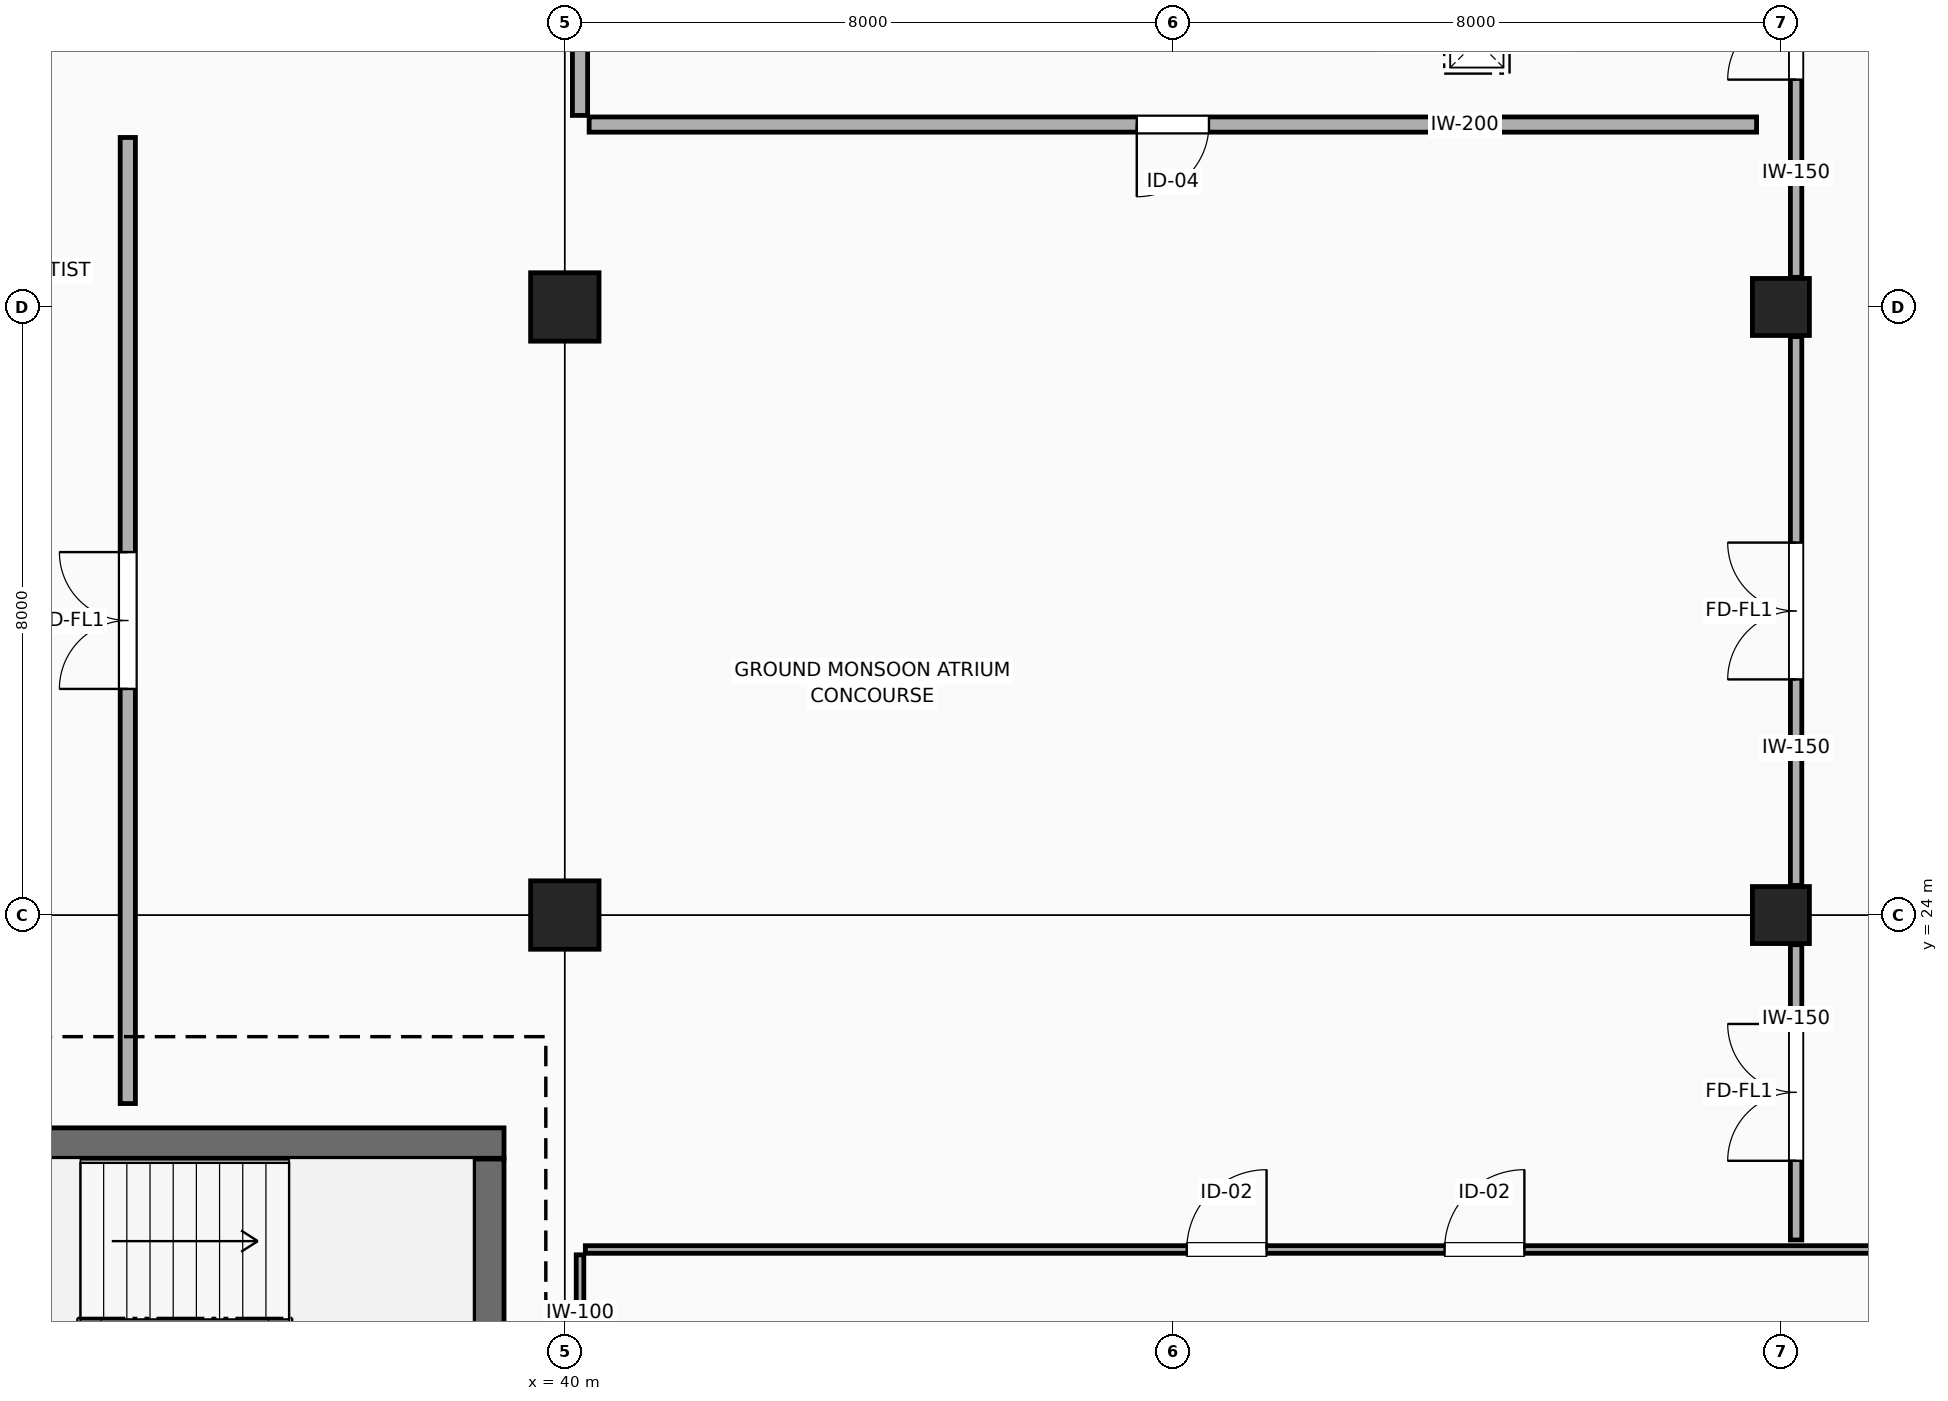
"""IFC4 building model, lengths in metres.
Left out: names, types, materials, properties, quantities, classifications, styles, units other than length and angle.
Written with IfcOpenShell. Run it as: python <this file> out.ifc"""

import sys

from ifc_helpers import new_model, si_unit, direction, frame, frame_2d, origin, origin_2d, place, context, subcontext, project, spatial, rectangle, extrude, element, fill, save


model = new_model("IFC4")
c1 = context("Model", 3, precision=1e-05, world=origin(), true_north=direction((0.0, 1.0)))
c2 = subcontext(c1, "Body", "Model", "MODEL_VIEW")
j1 = project(units=[si_unit("LENGTHUNIT", "METRE"), si_unit("PLANEANGLEUNIT", "RADIAN")], contexts=[c1])
p1 = place(None, origin())
s1 = spatial("IfcSite", under=j1, at=p1, CompositionType="ELEMENT")
p2 = place(p1, origin())
s2 = spatial("IfcBuilding", under=s1, at=p2, CompositionType="ELEMENT")
p3 = place(p2, origin())
s3 = spatial("IfcBuildingStorey", under=s2, at=p3, CompositionType="ELEMENT", Elevation=0.0)
for number, where, z_axis, x_axis in (
    (1, (40.0, 24.0, 0.0), (0.0, 0.0, 1.0), (1.0, 0.0, 0.0)),
    (2, (40.0, 32.0, 0.0), (0.0, 0.0, 1.0), (1.0, 0.0, 0.0)),
):
    element("IfcColumn", number, at=place(p3, frame(where, z_axis=z_axis, x_axis=x_axis)), inside=s3, PredefinedType="COLUMN", context=c2, shape_type="SweptSolid", body=[
        extrude(rectangle(XDim=0.9, YDim=0.9, at=origin_2d()), origin(), (0.0, 0.0, 1.0), 5.4),
    ])
for number, where, z_axis, x_axis in (
    (3, (56.0, 24.0, 0.0), (0.0, 0.0, 1.0), (1.0, 0.0, 0.0)),
    (4, (56.0, 32.0, 0.0), (0.0, 0.0, 1.0), (1.0, 0.0, 0.0)),
):
    element("IfcColumn", number, at=place(p3, frame(where, z_axis=z_axis, x_axis=x_axis)), inside=s3, PredefinedType="COLUMN", context=c2, shape_type="SweptSolid", body=[
        extrude(rectangle(XDim=0.75, YDim=0.75, at=origin_2d()), origin(), (0.0, 0.0, 1.0), 5.4),
    ])
p4 = place(p3, frame((39.2, 21.0, 0.0), z_axis=(0.0, 0.0, 1.0), x_axis=(-1.0, 0.0, 0.0)))
e5 = element("IfcWall", 5, at=p4, inside=s3, PredefinedType="SHEAR", context=c2, shape_type="SweptSolid", body=[
    extrude(rectangle(XDim=8.896, YDim=0.4, at=frame_2d((4.448, 0.0))), origin(), (0.0, 0.0, 1.0), 5.12),
])
p5 = place(p3, frame((39.0, 12.41, 0.0), z_axis=(0.0, 0.0, 1.0), x_axis=(0.0, 1.0, 0.0)))
e6 = element("IfcWall", 6, at=p5, inside=s3, PredefinedType="SHEAR", context=c2, shape_type="SweptSolid", body=[
    extrude(rectangle(XDim=8.38, YDim=0.4, at=frame_2d((4.19, 0.0))), origin(), (0.0, 0.0, 1.0), 5.12),
])
p6 = place(p3, frame((40.27, 19.6, 0.0), z_axis=(0.0, 0.0, 1.0), x_axis=(1.0, 0.0, 0.0)))
e7 = element("IfcWall", 7, at=p6, inside=s3, PredefinedType="PARTITIONING", context=c2, shape_type="SweptSolid", body=[
    extrude(rectangle(XDim=23.66, YDim=0.1, at=frame_2d((11.83, 0.0))), origin(), (0.0, 0.0, 1.0), 4.3),
])
p7 = place(p6, frame((11.305, 0.0, 0.0)))
e8 = element("IfcOpeningElement", 8, at=p7, cuts=e7, PredefinedType="OPENING", context=c2, shape_type="SweptSolid", body=[
    extrude(rectangle(XDim=1.05, YDim=2.15, at=frame_2d((0.525, 1.075))), frame((0.0, 0.06, 0.0), z_axis=(0.0, -1.0, 0.0), x_axis=(1.0, 0.0, 0.0)), (0.0, 0.0, 1.0), 0.12),
])
p8 = place(p6, frame((7.913, 0.0, 0.0)))
e9 = element("IfcOpeningElement", 9, at=p8, cuts=e7, PredefinedType="OPENING", context=c2, shape_type="SweptSolid", body=[
    extrude(rectangle(XDim=1.05, YDim=2.15, at=frame_2d((0.525, 1.075))), frame((0.0, 0.06, 0.0), z_axis=(0.0, -1.0, 0.0), x_axis=(1.0, 0.0, 0.0)), (0.0, 0.0, 1.0), 0.12),
])
p9 = place(p3, frame((40.2, 16.465, 0.0), z_axis=(0.0, 0.0, 1.0), x_axis=(0.0, 1.0, 0.0)))
e10 = element("IfcWall", 10, at=p9, inside=s3, PredefinedType="PARTITIONING", context=c2, shape_type="SweptSolid", body=[
    extrude(rectangle(XDim=3.065, YDim=0.1, at=frame_2d((1.532, 0.0))), origin(), (0.0, 0.0, 1.0), 4.65),
])
p10 = place(p3, frame((56.2, 19.725, 0.0), z_axis=(0.0, 0.0, 1.0), x_axis=(0.0, 1.0, 0.0)))
e11 = element("IfcWall", 11, at=p10, inside=s3, PredefinedType="PARTITIONING", context=c2, shape_type="SweptSolid", body=[
    extrude(rectangle(XDim=3.885, YDim=0.15, at=frame_2d((1.942, 0.0))), origin(), (0.0, 0.0, 1.0), 4.45),
])
p11 = place(p10, frame((1.042, 0.0, 0.0)))
e12 = element("IfcOpeningElement", 12, at=p11, cuts=e11, PredefinedType="OPENING", context=c2, shape_type="SweptSolid", body=[
    extrude(rectangle(XDim=1.8, YDim=2.15, at=frame_2d((0.9, 1.075))), frame((0.0, 0.085, 0.0), z_axis=(0.0, -1.0, 0.0), x_axis=(1.0, 0.0, 0.0)), (0.0, 0.0, 1.0), 0.17),
])
p12 = place(p3, frame((56.2, 24.39, 0.0), z_axis=(0.0, 0.0, 1.0), x_axis=(0.0, 1.0, 0.0)))
e13 = element("IfcWall", 13, at=p12, inside=s3, PredefinedType="PARTITIONING", context=c2, shape_type="SweptSolid", body=[
    extrude(rectangle(XDim=7.22, YDim=0.15, at=frame_2d((3.61, 0.0))), origin(), (0.0, 0.0, 1.0), 4.65),
])
p13 = place(p12, frame((2.71, 0.0, 0.0)))
e14 = element("IfcOpeningElement", 14, at=p13, cuts=e13, PredefinedType="OPENING", context=c2, shape_type="SweptSolid", body=[
    extrude(rectangle(XDim=1.8, YDim=2.15, at=frame_2d((0.9, 1.075))), frame((0.0, 0.085, 0.0), z_axis=(0.0, -1.0, 0.0), x_axis=(1.0, 0.0, 0.0)), (0.0, 0.0, 1.0), 0.17),
])
p14 = place(p3, frame((56.2, 32.39, 0.0), z_axis=(0.0, 0.0, 1.0), x_axis=(0.0, 1.0, 0.0)))
e15 = element("IfcWall", 15, at=p14, inside=s3, PredefinedType="PARTITIONING", context=c2, shape_type="SweptSolid", body=[
    extrude(rectangle(XDim=5.515, YDim=0.15, at=frame_2d((2.758, 0.0))), origin(), (0.0, 0.0, 1.0), 4.5),
])
p15 = place(p14, frame((2.601, 0.0, 0.0)))
e16 = element("IfcOpeningElement", 16, at=p15, cuts=e15, PredefinedType="OPENING", context=c2, shape_type="SweptSolid", body=[
    extrude(rectangle(XDim=1.8, YDim=2.15, at=frame_2d((0.9, 1.075))), frame((0.0, 0.085, 0.0), z_axis=(0.0, -1.0, 0.0), x_axis=(1.0, 0.0, 0.0)), (0.0, 0.0, 1.0), 0.17),
])
p16 = place(p3, frame((55.68, 34.4, 0.0), z_axis=(0.0, 0.0, 1.0), x_axis=(-1.0, 0.0, 0.0)))
e17 = element("IfcWall", 17, at=p16, inside=s3, PredefinedType="PARTITIONING", context=c2, shape_type="SweptSolid", body=[
    extrude(rectangle(XDim=15.36, YDim=0.2, at=frame_2d((7.68, 0.0))), origin(), (0.0, 0.0, 1.0), 5.11),
])
p17 = place(p16, frame((7.205, 0.0, 0.0)))
e18 = element("IfcOpeningElement", 18, at=p17, cuts=e17, PredefinedType="OPENING", context=c2, shape_type="SweptSolid", body=[
    extrude(rectangle(XDim=0.95, YDim=2.15, at=frame_2d((0.475, 1.075))), frame((0.0, 0.11, 0.0), z_axis=(0.0, -1.0, 0.0), x_axis=(1.0, 0.0, 0.0)), (0.0, 0.0, 1.0), 0.22),
])
p18 = place(p3, frame((40.2, 34.52, 0.0), z_axis=(0.0, 0.0, 1.0), x_axis=(0.0, 1.0, 0.0)))
e19 = element("IfcWall", 19, at=p18, inside=s3, PredefinedType="PARTITIONING", context=c2, shape_type="SweptSolid", body=[
    extrude(rectangle(XDim=6.015, YDim=0.2, at=frame_2d((3.007, 0.0))), origin(), (0.0, 0.0, 1.0), 4.25),
])
p19 = place(p3, frame((34.25, 21.52, 0.0), z_axis=(0.0, 0.0, 1.0), x_axis=(0.0, 1.0, 0.0)))
e20 = element("IfcWall", 20, at=p19, inside=s3, PredefinedType="PARTITIONING", context=c2, shape_type="SweptSolid", body=[
    extrude(rectangle(XDim=12.71, YDim=0.2, at=frame_2d((6.355, 0.0))), origin(), (0.0, 0.0, 1.0), 5.11),
])
p20 = place(p19, frame((5.455, 0.0, 0.0)))
e21 = element("IfcOpeningElement", 21, at=p20, cuts=e20, PredefinedType="OPENING", context=c2, shape_type="SweptSolid", body=[
    extrude(rectangle(XDim=1.8, YDim=2.15, at=frame_2d((0.9, 1.075))), frame((0.0, 0.11, 0.0), z_axis=(0.0, -1.0, 0.0), x_axis=(1.0, 0.0, 0.0)), (0.0, 0.0, 1.0), 0.22),
])
p21 = place(p7, origin())
e22 = element("IfcDoor", 22, at=p21, inside=s3, OperationType="SINGLE_SWING_RIGHT", PredefinedType="DOOR", context=c2, shape_type="SweptSolid", body=[
    extrude(rectangle(XDim=1.05, YDim=2.15, at=frame_2d((0.525, 1.075))), frame((0.0, 0.025, 0.0), z_axis=(0.0, -1.0, 0.0), x_axis=(1.0, 0.0, 0.0)), (0.0, 0.0, 1.0), 0.05),
])
fill(e8, e22)
p22 = place(p17, origin())
e23 = element("IfcDoor", 23, at=p22, inside=s3, OperationType="SINGLE_SWING_RIGHT", PredefinedType="DOOR", context=c2, shape_type="SweptSolid", body=[
    extrude(rectangle(XDim=0.95, YDim=2.15, at=frame_2d((0.475, 1.075))), frame((0.0, 0.025, 0.0), z_axis=(0.0, -1.0, 0.0), x_axis=(1.0, 0.0, 0.0)), (0.0, 0.0, 1.0), 0.05),
])
fill(e18, e23)
p23 = place(p8, origin())
e24 = element("IfcDoor", 24, at=p23, inside=s3, OperationType="SINGLE_SWING_RIGHT", PredefinedType="DOOR", context=c2, shape_type="SweptSolid", body=[
    extrude(rectangle(XDim=1.05, YDim=2.15, at=frame_2d((0.525, 1.075))), frame((0.0, 0.025, 0.0), z_axis=(0.0, -1.0, 0.0), x_axis=(1.0, 0.0, 0.0)), (0.0, 0.0, 1.0), 0.05),
])
fill(e9, e24)
p24 = place(p11, origin())
e25 = element("IfcDoor", 25, at=p24, inside=s3, OperationType="DOUBLE_DOOR_SINGLE_SWING", PredefinedType="DOOR", context=c2, shape_type="SweptSolid", body=[
    extrude(rectangle(XDim=1.8, YDim=2.15, at=frame_2d((0.9, 1.075))), frame((0.0, 0.025, 0.0), z_axis=(0.0, -1.0, 0.0), x_axis=(1.0, 0.0, 0.0)), (0.0, 0.0, 1.0), 0.05),
])
fill(e12, e25)
p25 = place(p13, origin())
e26 = element("IfcDoor", 26, at=p25, inside=s3, OperationType="DOUBLE_DOOR_SINGLE_SWING", PredefinedType="DOOR", context=c2, shape_type="SweptSolid", body=[
    extrude(rectangle(XDim=1.8, YDim=2.15, at=frame_2d((0.9, 1.075))), frame((0.0, 0.025, 0.0), z_axis=(0.0, -1.0, 0.0), x_axis=(1.0, 0.0, 0.0)), (0.0, 0.0, 1.0), 0.05),
])
fill(e14, e26)
p26 = place(p15, origin())
e27 = element("IfcDoor", 27, at=p26, inside=s3, OperationType="DOUBLE_DOOR_SINGLE_SWING", PredefinedType="DOOR", context=c2, shape_type="SweptSolid", body=[
    extrude(rectangle(XDim=1.8, YDim=2.15, at=frame_2d((0.9, 1.075))), frame((0.0, 0.025, 0.0), z_axis=(0.0, -1.0, 0.0), x_axis=(1.0, 0.0, 0.0)), (0.0, 0.0, 1.0), 0.05),
])
fill(e16, e27)
p27 = place(p20, origin())
e28 = element("IfcDoor", 28, at=p27, inside=s3, OperationType="DOUBLE_DOOR_SINGLE_SWING", PredefinedType="DOOR", context=c2, shape_type="SweptSolid", body=[
    extrude(rectangle(XDim=1.8, YDim=2.15, at=frame_2d((0.9, 1.075))), frame((0.0, 0.025, 0.0), z_axis=(0.0, -1.0, 0.0), x_axis=(1.0, 0.0, 0.0)), (0.0, 0.0, 1.0), 0.05),
])
fill(e21, e28)
save(model, sys.argv[1])
